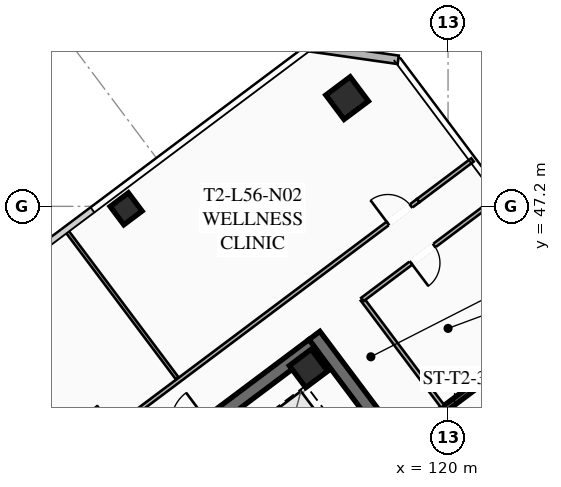
"""IFC4 building model, lengths in metres.
Left out: names, types, materials, properties, quantities, classifications, styles, units other than length and angle.
Written with IfcOpenShell. Run it as: python <this file> out.ifc"""

import sys

from ifc_helpers import new_model, si_unit, direction, frame, frame_2d, origin, origin_2d, place, context, subcontext, project, spatial, rectangle, hollow_rectangle, extrude, element, fill, save


model = new_model("IFC4")
c1 = context("Model", 3, precision=1e-05, world=origin(), true_north=direction((0.0, 1.0)))
c2 = subcontext(c1, "Body", "Model", "MODEL_VIEW")
j1 = project(units=[si_unit("LENGTHUNIT", "METRE"), si_unit("PLANEANGLEUNIT", "RADIAN")], contexts=[c1])
p1 = place(None, origin())
s1 = spatial("IfcSite", under=j1, at=p1, CompositionType="ELEMENT")
p2 = place(p1, origin())
s2 = spatial("IfcBuilding", under=s1, at=p2, CompositionType="ELEMENT")
p3 = place(p2, frame((0.0, 0.0, 207.75)))
s3 = spatial("IfcBuildingStorey", under=s2, at=p3, CompositionType="ELEMENT", Elevation=207.75)
p4 = place(p3, frame((115.604, 42.953, 0.0), z_axis=(0.0, 0.0, 1.0), x_axis=(0.600005007985, -0.799996243986, 0.0)))
e1 = element("IfcWall", 1, at=p4, inside=s3, PredefinedType="SHEAR", context=c2, shape_type="SweptSolid", body=[
    extrude(rectangle(XDim=15.6, YDim=0.45, at=frame_2d((7.8, 0.0))), origin(), (0.0, 0.0, 1.0), 3.55),
])
p5 = place(p3, frame((103.351, 33.482, 0.0), z_axis=(0.0, 0.0, 1.0), x_axis=(0.8, 0.6, 0.0)))
e2 = element("IfcWall", 2, at=p5, inside=s3, PredefinedType="SHEAR", context=c2, shape_type="SweptSolid", body=[
    extrude(rectangle(XDim=15.26, YDim=0.45, at=frame_2d((7.63, 0.0))), origin(), (0.0, 0.0, 1.0), 3.55),
])
p6 = place(p5, frame((4.68, 0.0, 0.0)))
e3 = element("IfcOpeningElement", 3, at=p6, cuts=e2, PredefinedType="OPENING", context=c2, shape_type="SweptSolid", body=[
    extrude(rectangle(XDim=1.25, YDim=2.25, at=frame_2d((0.625, 1.125))), frame((0.0, 0.235, 0.0), z_axis=(0.0, -1.0, 0.0), x_axis=(1.0, 0.0, 0.0)), (0.0, 0.0, 1.0), 0.47),
])
p7 = place(p5, frame((9.73, 0.0, 0.0)))
e4 = element("IfcOpeningElement", 4, at=p7, cuts=e2, PredefinedType="OPENING", context=c2, shape_type="SweptSolid", body=[
    extrude(rectangle(XDim=1.25, YDim=2.25, at=frame_2d((0.625, 1.125))), frame((0.0, 0.235, 0.0), z_axis=(0.0, -1.0, 0.0), x_axis=(1.0, 0.0, 0.0)), (0.0, 0.0, 1.0), 0.47),
])
p8 = place(p3, frame((115.41, 41.87, 0.0), z_axis=(0.0, 0.0, 1.0), x_axis=(0.799999996291, 0.600000004945, 0.0)))
e5 = element("IfcColumn", 5, at=p8, inside=s3, PredefinedType="COLUMN", context=c2, shape_type="SweptSolid", body=[
    extrude(hollow_rectangle(XDim=0.9, YDim=0.9, WallThickness=0.04, at=origin_2d()), origin(), (0.0, 0.0, 1.0), 3.37),
])
p9 = place(p3, frame((116.68, 50.76, 0.0), z_axis=(0.0, 0.0, 1.0), x_axis=(0.799999996291, 0.600000004945, 0.0)))
e6 = element("IfcColumn", 6, at=p9, inside=s3, PredefinedType="COLUMN", context=c2, shape_type="SweptSolid", body=[
    extrude(hollow_rectangle(XDim=1.0, YDim=1.0, WallThickness=0.04, at=origin_2d()), origin(), (0.0, 0.0, 1.0), 3.37),
])
p10 = place(p3, frame((109.41, 47.12, 0.0), z_axis=(0.0, 0.0, 1.0), x_axis=(0.799999996291, 0.600000004945, 0.0)))
e7 = element("IfcColumn", 7, at=p10, inside=s3, PredefinedType="COLUMN", context=c2, shape_type="SweptSolid", body=[
    extrude(hollow_rectangle(XDim=0.75, YDim=0.75, WallThickness=0.032, at=origin_2d()), origin(), (0.0, 0.0, 1.0), 3.37),
])
p11 = place(p3, frame((115.42, 52.44, 0.0), z_axis=(0.0, 0.0, 1.0), x_axis=(0.989954425158, -0.14138683146, 0.0)))
e8 = element("IfcWall", 8, at=p11, inside=s3, PredefinedType="SOLIDWALL", context=c2, shape_type="SweptSolid", body=[
    extrude(rectangle(XDim=2.97, YDim=0.28, at=frame_2d((1.485, 0.0))), origin(), (0.0, 0.0, 1.0), 3.37),
])
p12 = place(p3, frame((121.204, 41.528, 0.0), z_axis=(0.0, 0.0, 1.0), x_axis=(-0.800017232136, -0.599977023131, 0.0)))
e9 = element("IfcWall", 9, at=p12, inside=s3, PredefinedType="SHEAR", context=c2, shape_type="SweptSolid", body=[
    extrude(rectangle(XDim=3.4, YDim=0.2, at=frame_2d((1.7, 0.0))), origin(), (0.0, 0.0, 1.0), 3.37),
])
p13 = place(p12, frame((1.975, 0.0, 0.0)))
e10 = element("IfcOpeningElement", 10, at=p13, cuts=e9, PredefinedType="OPENING", context=c2, shape_type="SweptSolid", body=[
    extrude(rectangle(XDim=1.15, YDim=2.2, at=frame_2d((0.575, 1.1))), frame((0.0, 0.11, 0.0), z_axis=(0.0, -1.0, 0.0), x_axis=(1.0, 0.0, 0.0)), (0.0, 0.0, 1.0), 0.22),
])
p14 = place(p3, frame((119.824, 40.618, 0.0), z_axis=(0.0, 0.0, 1.0), x_axis=(-0.599982243973, 0.800013316712, 0.0)))
e11 = element("IfcWall", 11, at=p14, inside=s3, PredefinedType="PARTITIONING", context=c2, shape_type="SweptSolid", body=[
    extrude(rectangle(XDim=4.4, YDim=0.135, at=frame_2d((2.2, 0.0))), origin(), (0.0, 0.0, 1.0), 2.723),
])
p15 = place(p3, frame((100.756, 33.692, 0.0), z_axis=(0.0, 0.0, 1.0), x_axis=(0.799998716732, 0.60000171102, 0.0)))
e12 = element("IfcWall", 12, at=p15, inside=s3, PredefinedType="PARTITIONING", context=c2, shape_type="SweptSolid", body=[
    extrude(rectangle(XDim=22.83, YDim=0.135, at=frame_2d((11.415, 0.0))), origin(), (0.0, 0.0, 1.0), 2.723),
])
p16 = place(p15, frame((9.38, 0.0, 0.0)))
e13 = element("IfcOpeningElement", 13, at=p16, cuts=e12, PredefinedType="OPENING", context=c2, shape_type="SweptSolid", body=[
    extrude(rectangle(XDim=0.95, YDim=2.05, at=frame_2d((0.475, 1.025))), frame((0.0, 0.077, 0.0), z_axis=(0.0, -1.0, 0.0), x_axis=(1.0, 0.0, 0.0)), (0.0, 0.0, 1.0), 0.155),
])
p17 = place(p15, frame((21.58, 0.0, 0.0)))
e14 = element("IfcOpeningElement", 14, at=p17, cuts=e12, PredefinedType="OPENING", context=c2, shape_type="SweptSolid", body=[
    extrude(rectangle(XDim=0.95, YDim=2.05, at=frame_2d((0.475, 1.025))), frame((0.0, 0.077, 0.0), z_axis=(0.0, -1.0, 0.0), x_axis=(1.0, 0.0, 0.0)), (0.0, 0.0, 1.0), 0.155),
])
p18 = place(p3, frame((119.02, 47.39, 0.0), z_axis=(0.0, 0.0, 1.0), x_axis=(0.799960585956, 0.600052548463, 0.0)))
e15 = element("IfcWall", 15, at=p18, inside=s3, PredefinedType="PARTITIONING", context=c2, shape_type="SweptSolid", body=[
    extrude(rectangle(XDim=2.23, YDim=0.135, at=frame_2d((1.115, 0.0))), origin(), (0.0, 0.0, 1.0), 2.723),
])
p19 = place(p3, frame((111.092, 41.544, 0.0), z_axis=(0.0, 0.0, 1.0), x_axis=(-0.600006403464, 0.799995197362, 0.0)))
e16 = element("IfcWall", 16, at=p19, inside=s3, PredefinedType="PARTITIONING", context=c2, shape_type="SweptSolid", body=[
    extrude(rectangle(XDim=6.1, YDim=0.11, at=frame_2d((3.05, 0.0))), origin(), (0.0, 0.0, 1.0), 2.723),
])
p20 = place(p3, frame((121.704, 47.528, 0.0), z_axis=(0.0, 0.0, 1.0), x_axis=(-0.799989629485, -0.600013827105, 0.0)))
e17 = element("IfcWall", 17, at=p20, inside=s3, PredefinedType="PARTITIONING", context=c2, shape_type="SweptSolid", body=[
    extrude(rectangle(XDim=5.65, YDim=0.135, at=frame_2d((2.825, 0.0))), origin(), (0.0, 0.0, 1.0), 2.723),
])
p21 = place(p20, frame((2.7, 0.0, 0.0)))
e18 = element("IfcOpeningElement", 18, at=p21, cuts=e17, PredefinedType="OPENING", context=c2, shape_type="SweptSolid", body=[
    extrude(rectangle(XDim=0.95, YDim=2.05, at=frame_2d((0.475, 1.025))), frame((0.0, 0.077, 0.0), z_axis=(0.0, -1.0, 0.0), x_axis=(1.0, 0.0, 0.0)), (0.0, 0.0, 1.0), 0.155),
])
p22 = place(p17, origin())
e19 = element("IfcDoor", 19, at=p22, inside=s3, OperationType="SINGLE_SWING_LEFT", PredefinedType="DOOR", context=c2, shape_type="SweptSolid", body=[
    extrude(rectangle(XDim=0.95, YDim=2.05, at=frame_2d((0.475, 1.025))), frame((0.0, 0.025, 0.0), z_axis=(0.0, -1.0, 0.0), x_axis=(1.0, 0.0, 0.0)), (0.0, 0.0, 1.0), 0.05),
])
fill(e14, e19)
p23 = place(p21, origin())
e20 = element("IfcDoor", 20, at=p23, inside=s3, OperationType="SINGLE_SWING_RIGHT", PredefinedType="DOOR", context=c2, shape_type="SweptSolid", body=[
    extrude(rectangle(XDim=0.95, YDim=2.05, at=frame_2d((0.475, 1.025))), frame((0.0, 0.025, 0.0), z_axis=(0.0, -1.0, 0.0), x_axis=(1.0, 0.0, 0.0)), (0.0, 0.0, 1.0), 0.05),
])
fill(e18, e20)
save(model, sys.argv[1])
